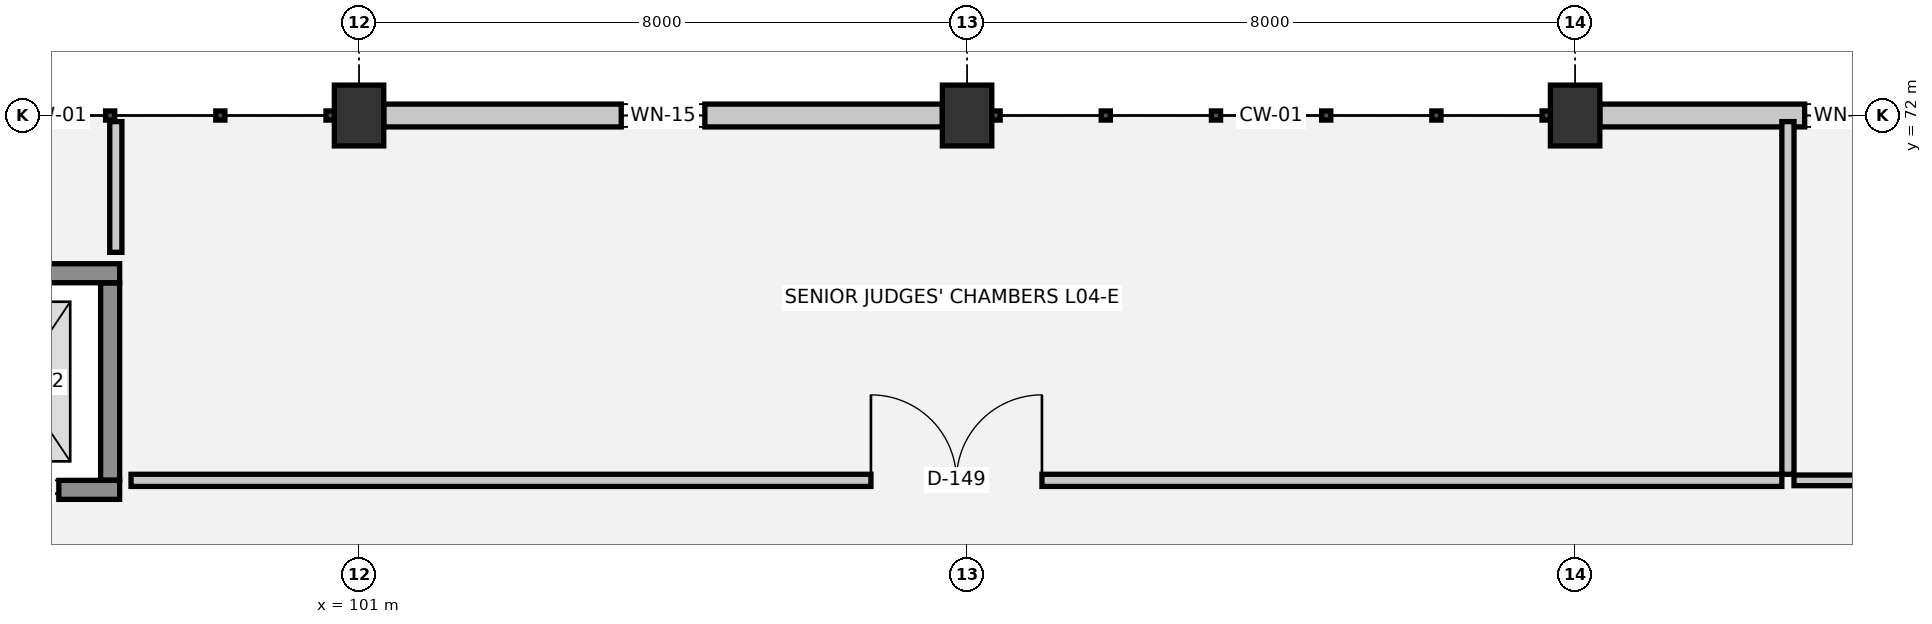
"""IFC4 building model, lengths in metres.
Left out: names, types, materials, properties, quantities, classifications, styles, units other than length and angle.
Written with IfcOpenShell. Run it as: python <this file> out.ifc"""

import sys

from ifc_helpers import new_model, si_unit, direction, frame, frame_2d, origin, origin_2d, place, context, subcontext, project, spatial, rectangle, extrude, element, fill, save


model = new_model("IFC4")
c1 = context("Model", 3, precision=1e-05, world=origin(), true_north=direction((0.0, 1.0)))
c2 = subcontext(c1, "Body", "Model", "MODEL_VIEW")
j1 = project(units=[si_unit("LENGTHUNIT", "METRE"), si_unit("PLANEANGLEUNIT", "RADIAN")], contexts=[c1])
p1 = place(None, origin())
s1 = spatial("IfcSite", under=j1, at=p1, CompositionType="ELEMENT")
p2 = place(p1, origin())
s2 = spatial("IfcBuilding", under=s1, at=p2, CompositionType="ELEMENT")
p3 = place(p2, frame((0.0, 0.0, 14.4)))
s3 = spatial("IfcBuildingStorey", under=s2, at=p3, CompositionType="ELEMENT", Elevation=14.4)
for number, where, z_axis, x_axis in (
    (1, (101.0, 72.0, 0.0), (0.0, 0.0, 1.0), (1.0, 0.0, 0.0)),
    (2, (109.0, 72.0, 0.0), (0.0, 0.0, 1.0), (1.0, 0.0, 0.0)),
    (3, (117.0, 72.0, 0.0), (0.0, 0.0, 1.0), (1.0, 0.0, 0.0)),
):
    element("IfcColumn", number, at=place(p3, frame(where, z_axis=z_axis, x_axis=x_axis)), inside=s3, PredefinedType="COLUMN", context=c2, shape_type="SweptSolid", body=[
        extrude(rectangle(XDim=0.65, YDim=0.8, at=origin_2d()), origin(), (0.0, 0.0, 1.0), 3.9),
    ])
p4 = place(p3, frame((101.325, 72.0, 0.0), z_axis=(0.0, 0.0, 1.0), x_axis=(1.0, 0.0, 0.0)))
e4 = element("IfcWall", 4, at=p4, inside=s3, PredefinedType="SOLIDWALL", context=c2, shape_type="SweptSolid", body=[
    extrude(rectangle(XDim=7.35, YDim=0.3, at=frame_2d((3.675, 0.0))), origin(), (0.0, 0.0, 1.0), 2.61),
])
p5 = place(p4, frame((3.125, 0.0, 1.0)))
e5 = element("IfcOpeningElement", 5, at=p5, cuts=e4, PredefinedType="OPENING", context=c2, shape_type="SweptSolid", body=[
    extrude(rectangle(XDim=1.1, YDim=1.2, at=frame_2d((0.55, 0.6))), frame((0.0, 0.16, 0.0), z_axis=(0.0, -1.0, 0.0), x_axis=(1.0, 0.0, 0.0)), (0.0, 0.0, 1.0), 0.32),
])
p6 = place(p3, frame((117.325, 72.0, 0.0), z_axis=(0.0, 0.0, 1.0), x_axis=(1.0, 0.0, 0.0)))
e6 = element("IfcWall", 6, at=p6, inside=s3, PredefinedType="SOLIDWALL", context=c2, shape_type="SweptSolid", body=[
    extrude(rectangle(XDim=6.35, YDim=0.3, at=frame_2d((3.175, 0.0))), origin(), (0.0, 0.0, 1.0), 2.61),
])
p7 = place(p6, frame((2.695, 0.0, 1.0)))
e7 = element("IfcOpeningElement", 7, at=p7, cuts=e6, PredefinedType="OPENING", context=c2, shape_type="SweptSolid", body=[
    extrude(rectangle(XDim=1.1, YDim=1.2, at=frame_2d((0.55, 0.6))), frame((0.0, 0.16, 0.0), z_axis=(0.0, -1.0, 0.0), x_axis=(1.0, 0.0, 0.0)), (0.0, 0.0, 1.0), 0.32),
])
p8 = place(p3, frame((95.15, 67.075, 0.0), z_axis=(0.0, 0.0, 1.0), x_axis=(1.0, 0.0, 0.0)))
e8 = element("IfcWall", 8, at=p8, inside=s3, PredefinedType="SHEAR", context=c2, shape_type="SweptSolid", body=[
    extrude(rectangle(XDim=2.7, YDim=0.25, at=frame_2d((1.35, 0.0))), origin(), (0.0, 0.0, 1.0), 3.9),
])
p9 = place(p8, frame((0.8, 0.0, 0.0)))
e9 = element("IfcOpeningElement", 9, at=p9, cuts=e8, PredefinedType="OPENING", context=c2, shape_type="SweptSolid", body=[
    extrude(rectangle(XDim=1.1, YDim=2.15, at=frame_2d((0.55, 1.075))), frame((0.0, 0.135, 0.0), z_axis=(0.0, -1.0, 0.0), x_axis=(1.0, 0.0, 0.0)), (0.0, 0.0, 1.0), 0.27),
])
p10 = place(p3, frame((97.85, 69.925, 0.0), z_axis=(0.0, 0.0, 1.0), x_axis=(-1.0, 0.0, 0.0)))
e10 = element("IfcWall", 10, at=p10, inside=s3, PredefinedType="SHEAR", context=c2, shape_type="SweptSolid", body=[
    extrude(rectangle(XDim=2.7, YDim=0.25, at=frame_2d((1.35, 0.0))), origin(), (0.0, 0.0, 1.0), 3.9),
])
p11 = place(p3, frame((97.725, 67.205, 0.0), z_axis=(0.0, 0.0, 1.0), x_axis=(0.0, 1.0, 0.0)))
e11 = element("IfcWall", 11, at=p11, inside=s3, PredefinedType="SHEAR", context=c2, shape_type="SweptSolid", body=[
    extrude(rectangle(XDim=2.59, YDim=0.25, at=frame_2d((1.295, 0.0))), origin(), (0.0, 0.0, 1.0), 3.9),
])
p12 = place(p3, frame((98.0, 67.2, 0.0), z_axis=(0.0, 0.0, 1.0), x_axis=(1.0, 0.0, 0.0)))
e12 = element("IfcWall", 12, at=p12, inside=s3, PredefinedType="PARTITIONING", context=c2, shape_type="SweptSolid", body=[
    extrude(rectangle(XDim=21.72, YDim=0.16, at=frame_2d((10.86, 0.0))), origin(), (0.0, 0.0, 1.0), 3.54),
])
p13 = place(p12, frame((9.735, 0.0, 0.0)))
e13 = element("IfcOpeningElement", 13, at=p13, cuts=e12, PredefinedType="OPENING", context=c2, shape_type="SweptSolid", body=[
    extrude(rectangle(XDim=2.25, YDim=2.4, at=frame_2d((1.125, 1.2))), frame((0.0, 0.09, 0.0), z_axis=(0.0, -1.0, 0.0), x_axis=(1.0, 0.0, 0.0)), (0.0, 0.0, 1.0), 0.18),
])
p14 = place(p3, frame((119.88, 67.2, 0.0), z_axis=(0.0, 0.0, 1.0), x_axis=(1.0, 0.0, 0.0)))
e14 = element("IfcWall", 14, at=p14, inside=s3, PredefinedType="PLUMBINGWALL", context=c2, shape_type="SweptSolid", body=[
    extrude(rectangle(XDim=4.04, YDim=0.14, at=frame_2d((2.02, 0.0))), origin(), (0.0, 0.0, 1.0), 3.54),
])
p15 = place(p14, frame((1.56, 0.0, 0.0)))
e15 = element("IfcOpeningElement", 15, at=p15, cuts=e14, PredefinedType="OPENING", context=c2, shape_type="SweptSolid", body=[
    extrude(rectangle(XDim=0.92, YDim=2.1, at=frame_2d((0.46, 1.05))), frame((0.0, 0.08, 0.0), z_axis=(0.0, -1.0, 0.0), x_axis=(1.0, 0.0, 0.0)), (0.0, 0.0, 1.0), 0.16),
])
p16 = place(p3, frame((97.8, 70.2, 0.0), z_axis=(0.0, 0.0, 1.0), x_axis=(0.0, 1.0, 0.0)))
e16 = element("IfcWall", 16, at=p16, inside=s3, PredefinedType="PARTITIONING", context=c2, shape_type="SweptSolid", body=[
    extrude(rectangle(XDim=1.72, YDim=0.16, at=frame_2d((0.86, 0.0))), origin(), (0.0, 0.0, 1.0), 3.54),
])
p17 = place(p3, frame((119.8, 67.28, 0.0), z_axis=(0.0, 0.0, 1.0), x_axis=(0.0, 1.0, 0.0)))
e17 = element("IfcWall", 17, at=p17, inside=s3, PredefinedType="PARTITIONING", context=c2, shape_type="SweptSolid", body=[
    extrude(rectangle(XDim=4.64, YDim=0.16, at=frame_2d((2.32, 0.0))), origin(), (0.0, 0.0, 1.0), 3.54),
])
p18 = place(p5, origin())
e18 = element("IfcWindow", 18, at=p18, inside=s3, PartitioningType="SINGLE_PANEL", PredefinedType="WINDOW", context=c2, shape_type="SweptSolid", body=[
    extrude(rectangle(XDim=1.1, YDim=1.2, at=frame_2d((0.55, 0.6))), frame((0.0, 0.03, 0.0), z_axis=(0.0, -1.0, 0.0), x_axis=(1.0, 0.0, 0.0)), (0.0, 0.0, 1.0), 0.06),
])
fill(e5, e18)
p19 = place(p7, origin())
e19 = element("IfcWindow", 19, at=p19, inside=s3, PartitioningType="SINGLE_PANEL", PredefinedType="WINDOW", context=c2, shape_type="SweptSolid", body=[
    extrude(rectangle(XDim=1.1, YDim=1.2, at=frame_2d((0.55, 0.6))), frame((0.0, 0.03, 0.0), z_axis=(0.0, -1.0, 0.0), x_axis=(1.0, 0.0, 0.0)), (0.0, 0.0, 1.0), 0.06),
])
fill(e7, e19)
p20 = place(p9, origin())
e20 = element("IfcDoor", 20, at=p20, inside=s3, OperationType="DOUBLE_DOOR_SLIDING", PredefinedType="DOOR", context=c2, shape_type="SweptSolid", body=[
    extrude(rectangle(XDim=1.1, YDim=2.15, at=frame_2d((0.55, 1.075))), frame((0.0, 0.025, 0.0), z_axis=(0.0, -1.0, 0.0), x_axis=(1.0, 0.0, 0.0)), (0.0, 0.0, 1.0), 0.05),
])
fill(e9, e20)
p21 = place(p13, origin())
e21 = element("IfcDoor", 21, at=p21, inside=s3, OperationType="DOUBLE_DOOR_SINGLE_SWING", PredefinedType="DOOR", context=c2, shape_type="SweptSolid", body=[
    extrude(rectangle(XDim=2.25, YDim=2.4, at=frame_2d((1.125, 1.2))), frame((0.0, 0.025, 0.0), z_axis=(0.0, -1.0, 0.0), x_axis=(1.0, 0.0, 0.0)), (0.0, 0.0, 1.0), 0.05),
])
fill(e13, e21)
save(model, sys.argv[1])
